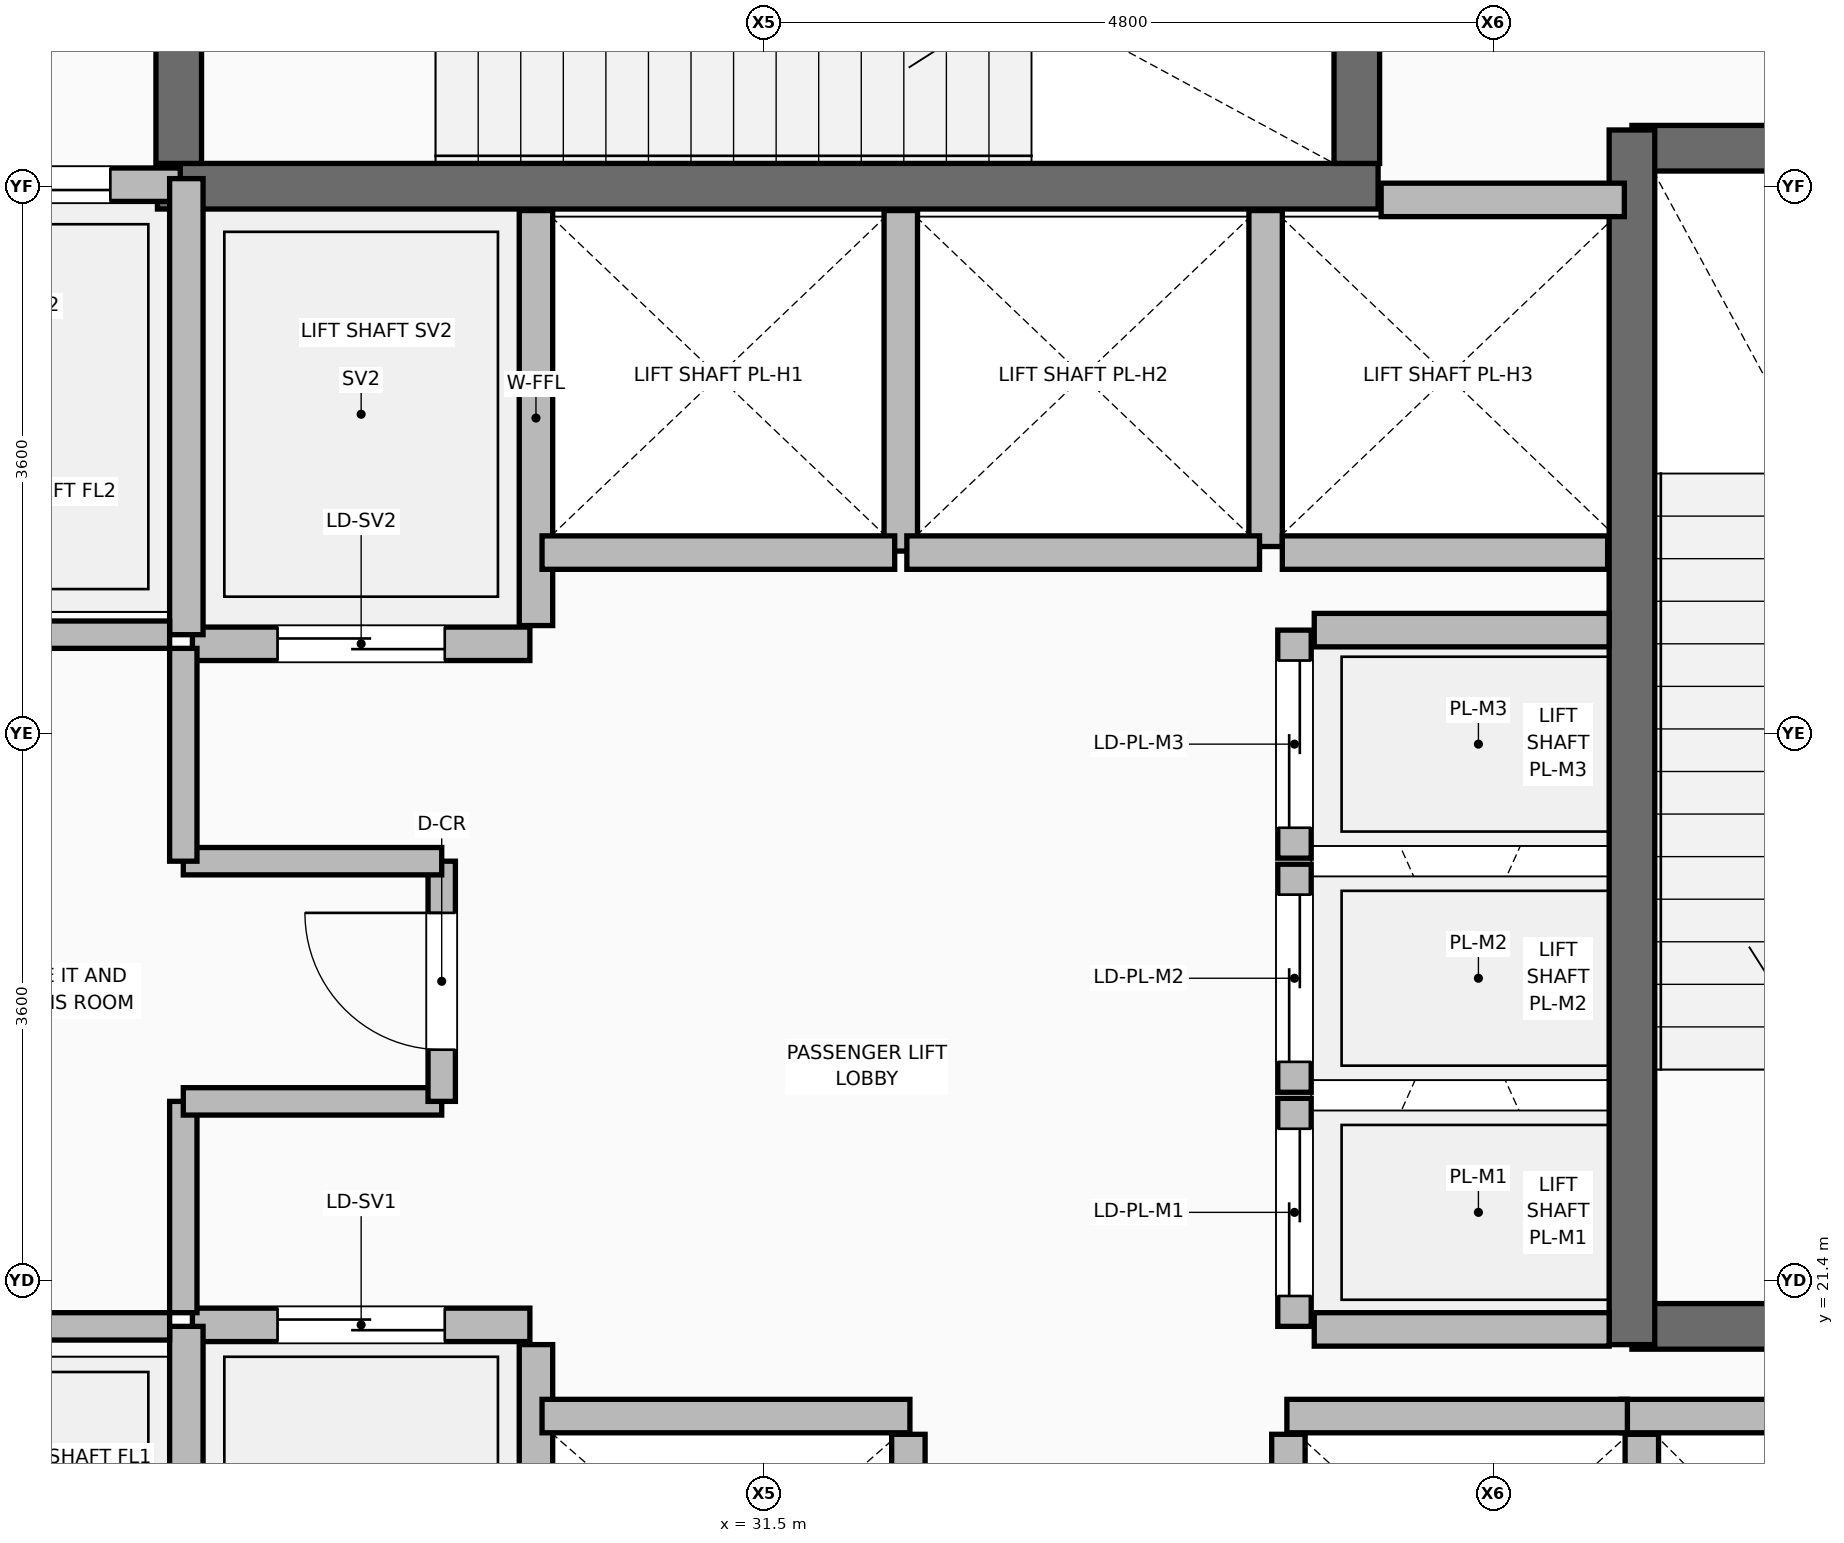
"""IFC4 building model, lengths in metres.
Left out: names, types, materials, properties, quantities, classifications, styles, units other than length and angle.
Written with IfcOpenShell. Run it as: python <this file> out.ifc"""

import sys

from ifc_helpers import new_model, si_unit, direction, frame, frame_2d, origin, place, context, subcontext, project, spatial, rectangle, extrude, element, fill, save


model = new_model("IFC4")
c1 = context("Model", 3, precision=1e-05, world=origin(), true_north=direction((0.0, 1.0)))
c2 = subcontext(c1, "Body", "Model", "MODEL_VIEW")
j1 = project(units=[si_unit("LENGTHUNIT", "METRE"), si_unit("PLANEANGLEUNIT", "RADIAN")], contexts=[c1])
p1 = place(None, origin())
s1 = spatial("IfcSite", under=j1, at=p1, CompositionType="ELEMENT")
p2 = place(p1, origin())
s2 = spatial("IfcBuilding", under=s1, at=p2, CompositionType="ELEMENT")
p3 = place(p2, frame((0.0, 0.0, 175.95)))
s3 = spatial("IfcBuildingStorey", under=s2, at=p3, CompositionType="ELEMENT", Elevation=175.95)
p4 = place(p3, frame((30.0, 18.08, 0.0), z_axis=(0.0, 0.0, 1.0), x_axis=(0.0, 1.0, 0.0)))
e1 = element("IfcWall", 1, at=p4, inside=s3, PredefinedType="PARTITIONING", context=c2, shape_type="SweptSolid", body=[
    extrude(rectangle(XDim=2.9, YDim=0.22, at=frame_2d((1.45, 0.0))), origin(), (0.0, 0.0, 1.0), 5.195),
])
for number, where, z_axis, x_axis in (
    (2, (32.45, 17.92, 0.0), (0.0, 0.0, 1.0), (0.0, 1.0, 0.0)),
    (3, (34.95, 17.92, 0.0), (0.0, 0.0, 1.0), (0.0, 1.0, 0.0)),
):
    element("IfcWall", number, at=place(p3, frame(where, z_axis=z_axis, x_axis=x_axis)), inside=s3, PredefinedType="PARTITIONING", context=c2, shape_type="SweptSolid", body=[
        extrude(rectangle(XDim=2.47, YDim=0.22, at=frame_2d((1.235, 0.0))), origin(), (0.0, 0.0, 1.0), 4.656),
    ])
p5 = place(p3, frame((37.275, 18.08, 0.0), z_axis=(0.0, 0.0, 1.0), x_axis=(0.0, 1.0, 0.0)))
e4 = element("IfcWall", 4, at=p5, inside=s3, PredefinedType="PARTITIONING", context=c2, shape_type="SweptSolid", body=[
    extrude(rectangle(XDim=2.31, YDim=0.22, at=frame_2d((1.155, 0.0))), origin(), (0.0, 0.0, 1.0), 5.195),
])
p6 = place(p3, frame((30.0, 25.71, 0.0), z_axis=(0.0, 0.0, 1.0), x_axis=(0.0, 1.0, 0.0)))
e5 = element("IfcWall", 5, at=p6, inside=s3, PredefinedType="PARTITIONING", context=c2, shape_type="SweptSolid", body=[
    extrude(rectangle(XDim=2.73, YDim=0.22, at=frame_2d((1.365, 0.0))), origin(), (0.0, 0.0, 1.0), 5.195),
])
p7 = place(p3, frame((32.4, 26.2, 0.0), z_axis=(0.0, 0.0, 1.0), x_axis=(0.0, 1.0, 0.0)))
e6 = element("IfcWall", 6, at=p7, inside=s3, PredefinedType="PARTITIONING", context=c2, shape_type="SweptSolid", body=[
    extrude(rectangle(XDim=2.24, YDim=0.22, at=frame_2d((1.12, 0.0))), origin(), (0.0, 0.0, 1.0), 5.195),
])
p8 = place(p3, frame((34.8, 26.23, 0.0), z_axis=(0.0, 0.0, 1.0), x_axis=(0.0, 1.0, 0.0)))
e7 = element("IfcWall", 7, at=p8, inside=s3, PredefinedType="PARTITIONING", context=c2, shape_type="SweptSolid", body=[
    extrude(rectangle(XDim=2.21, YDim=0.22, at=frame_2d((1.105, 0.0))), origin(), (0.0, 0.0, 1.0), 5.195),
])
p9 = place(p3, frame((34.91, 26.19, 0.0), z_axis=(0.0, 0.0, 1.0), x_axis=(1.0, 0.0, 0.0)))
e8 = element("IfcWall", 8, at=p9, inside=s3, PredefinedType="PARTITIONING", context=c2, shape_type="SweptSolid", body=[
    extrude(rectangle(XDim=2.14, YDim=0.22, at=frame_2d((1.07, 0.0))), origin(), (0.0, 0.0, 1.0), 5.195),
])
for number, where, z_axis, x_axis in (
    (9, (37.21, 21.1, 0.0), (0.0, 0.0, 1.0), (1.0, 0.0, 0.0)),
    (10, (37.21, 28.85, 0.0), (0.0, 0.0, 1.0), (1.0, 0.0, 0.0)),
):
    element("IfcWall", number, at=place(p3, frame(where, z_axis=z_axis, x_axis=x_axis)), inside=s3, PredefinedType="SHEAR", context=c2, shape_type="SweptSolid", body=[
        extrude(rectangle(XDim=3.615, YDim=0.3, at=frame_2d((1.808, 0.0))), origin(), (0.0, 0.0, 1.0), 5.22),
    ])
p10 = place(p3, frame((37.21, 20.98, 0.0), z_axis=(0.0, 0.0, 1.0), x_axis=(0.0, 1.0, 0.0)))
e11 = element("IfcWall", 11, at=p10, inside=s3, PredefinedType="SHEAR", context=c2, shape_type="SweptSolid", body=[
    extrude(rectangle(XDim=7.99, YDim=0.3, at=frame_2d((3.995, 0.0))), origin(), (0.0, 0.0, 1.0), 5.22),
])
p11 = place(p3, frame((27.51, 28.6, 0.0), z_axis=(0.0, 0.0, 1.0), x_axis=(1.0, 0.0, 0.0)))
e12 = element("IfcWall", 12, at=p11, inside=s3, PredefinedType="SHEAR", context=c2, shape_type="SweptSolid", body=[
    extrude(rectangle(XDim=8.03, YDim=0.3, at=frame_2d((4.015, 0.0))), origin(), (0.0, 0.0, 1.0), 5.22),
])
p12 = place(p3, frame((27.65, 28.75, 0.0), z_axis=(0.0, 0.0, 1.0), x_axis=(0.0, 1.0, 0.0)))
e13 = element("IfcWall", 13, at=p12, inside=s3, PredefinedType="SHEAR", context=c2, shape_type="SweptSolid", body=[
    extrude(rectangle(XDim=3.425, YDim=0.3, at=frame_2d((1.712, 0.0))), origin(), (0.0, 0.0, 1.0), 5.22),
])
p13 = place(p12, frame((1.0, 0.0, 0.0)))
e14 = element("IfcOpeningElement", 14, at=p13, cuts=e13, PredefinedType="OPENING", context=c2, shape_type="SweptSolid", body=[
    extrude(rectangle(XDim=1.05, YDim=2.1, at=frame_2d((0.525, 1.05))), frame((0.0, 0.16, 0.0), z_axis=(0.0, -1.0, 0.0), x_axis=(1.0, 0.0, 0.0)), (0.0, 0.0, 1.0), 0.32),
])
p14 = place(p3, frame((35.4, 28.75, 0.0), z_axis=(0.0, 0.0, 1.0), x_axis=(0.0, 1.0, 0.0)))
e15 = element("IfcWall", 15, at=p14, inside=s3, PredefinedType="SHEAR", context=c2, shape_type="SweptSolid", body=[
    extrude(rectangle(XDim=3.425, YDim=0.3, at=frame_2d((1.712, 0.0))), origin(), (0.0, 0.0, 1.0), 5.22),
])
p15 = place(p3, frame((25.64, 28.61, 0.0), z_axis=(0.0, 0.0, 1.0), x_axis=(1.0, 0.0, 0.0)))
e16 = element("IfcWall", 16, at=p15, inside=s3, PredefinedType="PARTITIONING", context=c2, shape_type="SweptSolid", body=[
    extrude(rectangle(XDim=2.02, YDim=0.22, at=frame_2d((1.01, 0.0))), origin(), (0.0, 0.0, 1.0), 5.2),
])
p16 = place(p15, frame((0.46, 0.0, 0.0)))
e17 = element("IfcOpeningElement", 17, at=p16, cuts=e16, PredefinedType="OPENING", context=c2, shape_type="SweptSolid", body=[
    extrude(rectangle(XDim=1.1, YDim=2.2, at=frame_2d((0.55, 1.1))), frame((0.0, 0.12, 0.0), z_axis=(0.0, -1.0, 0.0), x_axis=(1.0, 0.0, 0.0)), (0.0, 0.0, 1.0), 0.24),
])
p17 = place(p3, frame((27.74, 21.11, 0.0), z_axis=(0.0, 0.0, 1.0), x_axis=(1.0, 0.0, 0.0)))
e18 = element("IfcWall", 18, at=p17, inside=s3, PredefinedType="PARTITIONING", context=c2, shape_type="SweptSolid", body=[
    extrude(rectangle(XDim=2.22, YDim=0.22, at=frame_2d((1.11, 0.0))), origin(), (0.0, 0.0, 1.0), 5.2),
])
p18 = place(p17, frame((0.56, 0.0, 0.0)))
e19 = element("IfcOpeningElement", 19, at=p18, cuts=e18, PredefinedType="OPENING", context=c2, shape_type="SweptSolid", body=[
    extrude(rectangle(XDim=1.1, YDim=2.2, at=frame_2d((0.55, 1.1))), frame((0.0, 0.12, 0.0), z_axis=(0.0, -1.0, 0.0), x_axis=(1.0, 0.0, 0.0)), (0.0, 0.0, 1.0), 0.24),
])
p19 = place(p3, frame((27.74, 25.59, 0.0), z_axis=(0.0, 0.0, 1.0), x_axis=(1.0, 0.0, 0.0)))
e20 = element("IfcWall", 20, at=p19, inside=s3, PredefinedType="PARTITIONING", context=c2, shape_type="SweptSolid", body=[
    extrude(rectangle(XDim=2.22, YDim=0.22, at=frame_2d((1.11, 0.0))), origin(), (0.0, 0.0, 1.0), 5.2),
])
p20 = place(p19, frame((0.56, 0.0, 0.0)))
e21 = element("IfcOpeningElement", 21, at=p20, cuts=e20, PredefinedType="OPENING", context=c2, shape_type="SweptSolid", body=[
    extrude(rectangle(XDim=1.1, YDim=2.2, at=frame_2d((0.55, 1.1))), frame((0.0, 0.12, 0.0), z_axis=(0.0, -1.0, 0.0), x_axis=(1.0, 0.0, 0.0)), (0.0, 0.0, 1.0), 0.24),
])
p21 = place(p3, frame((30.04, 20.51, 0.0), z_axis=(0.0, 0.0, 1.0), x_axis=(1.0, 0.0, 0.0)))
e22 = element("IfcWall", 22, at=p21, inside=s3, PredefinedType="PARTITIONING", context=c2, shape_type="SweptSolid", body=[
    extrude(rectangle(XDim=2.42, YDim=0.22, at=frame_2d((1.21, 0.0))), origin(), (0.0, 0.0, 1.0), 5.2),
])
for number, where, z_axis, x_axis in (
    (23, (37.14, 20.51, 0.0), (0.0, 0.0, 1.0), (1.0, 0.0, 0.0)),
    (24, (34.94, 20.51, 0.0), (0.0, 0.0, 1.0), (1.0, 0.0, 0.0)),
):
    element("IfcWall", number, at=place(p3, frame(where, z_axis=z_axis, x_axis=x_axis)), inside=s3, PredefinedType="PARTITIONING", context=c2, shape_type="SweptSolid", body=[
        extrude(rectangle(XDim=2.24, YDim=0.22, at=frame_2d((1.12, 0.0))), origin(), (0.0, 0.0, 1.0), 5.2),
    ])
for number, where, z_axis, x_axis in (
    (25, (30.04, 26.19, 0.0), (0.0, 0.0, 1.0), (1.0, 0.0, 0.0)),
    (26, (32.44, 26.19, 0.0), (0.0, 0.0, 1.0), (1.0, 0.0, 0.0)),
):
    element("IfcWall", number, at=place(p3, frame(where, z_axis=z_axis, x_axis=x_axis)), inside=s3, PredefinedType="PARTITIONING", context=c2, shape_type="SweptSolid", body=[
        extrude(rectangle(XDim=2.32, YDim=0.22, at=frame_2d((1.16, 0.0))), origin(), (0.0, 0.0, 1.0), 5.2),
    ])
p22 = place(p3, frame((35.56, 28.51, 0.0), z_axis=(0.0, 0.0, 1.0), x_axis=(1.0, 0.0, 0.0)))
e27 = element("IfcWall", 27, at=p22, inside=s3, PredefinedType="PARTITIONING", context=c2, shape_type="SweptSolid", body=[
    extrude(rectangle(XDim=1.6, YDim=0.22, at=frame_2d((0.8, 0.0))), origin(), (0.0, 0.0, 1.0), 5.2),
])
p23 = place(p3, frame((34.99, 21.1, 0.0), z_axis=(0.0, 0.0, 1.0), x_axis=(0.0, 1.0, 0.0)))
e28 = element("IfcWall", 28, at=p23, inside=s3, PredefinedType="PARTITIONING", context=c2, shape_type="SweptSolid", body=[
    extrude(rectangle(XDim=1.5, YDim=0.22, at=frame_2d((0.75, 0.0))), origin(), (0.0, 0.0, 1.0), 5.2),
])
p24 = place(p23, frame((0.2, 0.0, 0.0)))
e29 = element("IfcOpeningElement", 29, at=p24, cuts=e28, PredefinedType="OPENING", context=c2, shape_type="SweptSolid", body=[
    extrude(rectangle(XDim=1.1, YDim=2.2, at=frame_2d((0.55, 1.1))), frame((0.0, 0.12, 0.0), z_axis=(0.0, -1.0, 0.0), x_axis=(1.0, 0.0, 0.0)), (0.0, 0.0, 1.0), 0.24),
])
p25 = place(p3, frame((34.99, 22.64, 0.0), z_axis=(0.0, 0.0, 1.0), x_axis=(0.0, 1.0, 0.0)))
e30 = element("IfcWall", 30, at=p25, inside=s3, PredefinedType="PARTITIONING", context=c2, shape_type="SweptSolid", body=[
    extrude(rectangle(XDim=1.5, YDim=0.22, at=frame_2d((0.75, 0.0))), origin(), (0.0, 0.0, 1.0), 5.2),
])
p26 = place(p25, frame((0.2, 0.0, 0.0)))
e31 = element("IfcOpeningElement", 31, at=p26, cuts=e30, PredefinedType="OPENING", context=c2, shape_type="SweptSolid", body=[
    extrude(rectangle(XDim=1.1, YDim=2.2, at=frame_2d((0.55, 1.1))), frame((0.0, 0.12, 0.0), z_axis=(0.0, -1.0, 0.0), x_axis=(1.0, 0.0, 0.0)), (0.0, 0.0, 1.0), 0.24),
])
p27 = place(p3, frame((34.99, 24.18, 0.0), z_axis=(0.0, 0.0, 1.0), x_axis=(0.0, 1.0, 0.0)))
e32 = element("IfcWall", 32, at=p27, inside=s3, PredefinedType="PARTITIONING", context=c2, shape_type="SweptSolid", body=[
    extrude(rectangle(XDim=1.5, YDim=0.22, at=frame_2d((0.75, 0.0))), origin(), (0.0, 0.0, 1.0), 5.2),
])
p28 = place(p27, frame((0.2, 0.0, 0.0)))
e33 = element("IfcOpeningElement", 33, at=p28, cuts=e32, PredefinedType="OPENING", context=c2, shape_type="SweptSolid", body=[
    extrude(rectangle(XDim=1.1, YDim=2.2, at=frame_2d((0.55, 1.1))), frame((0.0, 0.12, 0.0), z_axis=(0.0, -1.0, 0.0), x_axis=(1.0, 0.0, 0.0)), (0.0, 0.0, 1.0), 0.24),
])
p29 = place(p3, frame((27.7, 18.15, 0.0), z_axis=(0.0, 0.0, 1.0), x_axis=(0.0, 1.0, 0.0)))
e34 = element("IfcWall", 34, at=p29, inside=s3, PredefinedType="PARTITIONING", context=c2, shape_type="SweptSolid", body=[
    extrude(rectangle(XDim=2.95, YDim=0.22, at=frame_2d((1.475, 0.0))), origin(), (0.0, 0.0, 1.0), 5.2),
])
p30 = place(p3, frame((27.7, 25.65, 0.0), z_axis=(0.0, 0.0, 1.0), x_axis=(0.0, 1.0, 0.0)))
e35 = element("IfcWall", 35, at=p30, inside=s3, PredefinedType="PARTITIONING", context=c2, shape_type="SweptSolid", body=[
    extrude(rectangle(XDim=3.0, YDim=0.22, at=frame_2d((1.5, 0.0))), origin(), (0.0, 0.0, 1.0), 5.2),
])
for number, where, z_axis, x_axis in (
    (36, (35.12, 21.08, 0.0), (0.0, 0.0, 1.0), (1.0, 0.0, 0.0)),
    (37, (35.12, 25.68, 0.0), (0.0, 0.0, 1.0), (1.0, 0.0, 0.0)),
):
    element("IfcWall", number, at=place(p3, frame(where, z_axis=z_axis, x_axis=x_axis)), inside=s3, PredefinedType="PARTITIONING", context=c2, shape_type="SweptSolid", body=[
        extrude(rectangle(XDim=1.94, YDim=0.22, at=frame_2d((0.97, 0.0))), origin(), (0.0, 0.0, 1.0), 5.2),
    ])
for number, where, z_axis, x_axis in (
    (38, (25.89, 21.1, 0.0), (0.0, 0.0, 1.0), (1.0, 0.0, 0.0)),
    (39, (25.89, 25.65, 0.0), (0.0, 0.0, 1.0), (1.0, 0.0, 0.0)),
):
    element("IfcWall", number, at=place(p3, frame(where, z_axis=z_axis, x_axis=x_axis)), inside=s3, PredefinedType="PARTITIONING", context=c2, shape_type="SweptSolid", body=[
        extrude(rectangle(XDim=1.7, YDim=0.18, at=frame_2d((0.85, 0.0))), origin(), (0.0, 0.0, 1.0), 5.2),
    ])
p31 = place(p3, frame((27.68, 21.19, 0.0), z_axis=(0.0, 0.0, 1.0), x_axis=(0.0, 1.0, 0.0)))
e40 = element("IfcWall", 40, at=p31, inside=s3, PredefinedType="PARTITIONING", context=c2, shape_type="SweptSolid", body=[
    extrude(rectangle(XDim=1.39, YDim=0.18, at=frame_2d((0.695, 0.0))), origin(), (0.0, 0.0, 1.0), 5.2),
])
p32 = place(p3, frame((27.68, 22.58, 0.0), z_axis=(0.0, 0.0, 1.0), x_axis=(1.0, 0.0, 0.0)))
e41 = element("IfcWall", 41, at=p32, inside=s3, PredefinedType="PARTITIONING", context=c2, shape_type="SweptSolid", body=[
    extrude(rectangle(XDim=1.7, YDim=0.18, at=frame_2d((0.85, 0.0))), origin(), (0.0, 0.0, 1.0), 5.2),
])
p33 = place(p3, frame((29.38, 22.58, 0.0), z_axis=(0.0, 0.0, 1.0), x_axis=(0.0, 1.0, 0.0)))
e42 = element("IfcWall", 42, at=p33, inside=s3, PredefinedType="PARTITIONING", context=c2, shape_type="SweptSolid", body=[
    extrude(rectangle(XDim=1.58, YDim=0.18, at=frame_2d((0.79, 0.0))), origin(), (0.0, 0.0, 1.0), 5.2),
])
p34 = place(p33, frame((0.34, 0.0, 0.0)))
e43 = element("IfcOpeningElement", 43, at=p34, cuts=e42, PredefinedType="OPENING", context=c2, shape_type="SweptSolid", body=[
    extrude(rectangle(XDim=0.9, YDim=2.1, at=frame_2d((0.45, 1.05))), frame((0.0, 0.1, 0.0), z_axis=(0.0, -1.0, 0.0), x_axis=(1.0, 0.0, 0.0)), (0.0, 0.0, 1.0), 0.2),
])
p35 = place(p3, frame((27.68, 24.16, 0.0), z_axis=(0.0, 0.0, 1.0), x_axis=(1.0, 0.0, 0.0)))
e44 = element("IfcWall", 44, at=p35, inside=s3, PredefinedType="PARTITIONING", context=c2, shape_type="SweptSolid", body=[
    extrude(rectangle(XDim=1.7, YDim=0.18, at=frame_2d((0.85, 0.0))), origin(), (0.0, 0.0, 1.0), 5.2),
])
p36 = place(p3, frame((27.68, 24.16, 0.0), z_axis=(0.0, 0.0, 1.0), x_axis=(0.0, 1.0, 0.0)))
e45 = element("IfcWall", 45, at=p36, inside=s3, PredefinedType="PARTITIONING", context=c2, shape_type="SweptSolid", body=[
    extrude(rectangle(XDim=1.4, YDim=0.18, at=frame_2d((0.7, 0.0))), origin(), (0.0, 0.0, 1.0), 5.2),
])
p37 = place(p16, origin())
e46 = element("IfcDoor", 46, at=p37, inside=s3, OperationType="DOUBLE_DOOR_SLIDING", PredefinedType="DOOR", context=c2, shape_type="SweptSolid", body=[
    extrude(rectangle(XDim=1.1, YDim=2.2, at=frame_2d((0.55, 1.1))), frame((0.0, 0.025, 0.0), z_axis=(0.0, -1.0, 0.0), x_axis=(1.0, 0.0, 0.0)), (0.0, 0.0, 1.0), 0.05),
])
fill(e17, e46)
p38 = place(p18, origin())
e47 = element("IfcDoor", 47, at=p38, inside=s3, OperationType="DOUBLE_DOOR_SLIDING", PredefinedType="DOOR", context=c2, shape_type="SweptSolid", body=[
    extrude(rectangle(XDim=1.1, YDim=2.2, at=frame_2d((0.55, 1.1))), frame((0.0, 0.025, 0.0), z_axis=(0.0, -1.0, 0.0), x_axis=(1.0, 0.0, 0.0)), (0.0, 0.0, 1.0), 0.05),
])
fill(e19, e47)
p39 = place(p20, frame((1.1, 0.0, 0.0), z_axis=(0.0, 0.0, 1.0), x_axis=(-1.0, 0.0, 0.0)))
e48 = element("IfcDoor", 48, at=p39, inside=s3, OperationType="DOUBLE_DOOR_SLIDING", PredefinedType="DOOR", context=c2, shape_type="SweptSolid", body=[
    extrude(rectangle(XDim=1.1, YDim=2.2, at=frame_2d((0.55, 1.1))), frame((0.0, 0.025, 0.0), z_axis=(0.0, -1.0, 0.0), x_axis=(1.0, 0.0, 0.0)), (0.0, 0.0, 1.0), 0.05),
])
fill(e21, e48)
p40 = place(p24, origin())
e49 = element("IfcDoor", 49, at=p40, inside=s3, OperationType="DOUBLE_DOOR_SLIDING", PredefinedType="DOOR", context=c2, shape_type="SweptSolid", body=[
    extrude(rectangle(XDim=1.1, YDim=2.2, at=frame_2d((0.55, 1.1))), frame((0.0, 0.025, 0.0), z_axis=(0.0, -1.0, 0.0), x_axis=(1.0, 0.0, 0.0)), (0.0, 0.0, 1.0), 0.05),
])
fill(e29, e49)
p41 = place(p26, origin())
e50 = element("IfcDoor", 50, at=p41, inside=s3, OperationType="DOUBLE_DOOR_SLIDING", PredefinedType="DOOR", context=c2, shape_type="SweptSolid", body=[
    extrude(rectangle(XDim=1.1, YDim=2.2, at=frame_2d((0.55, 1.1))), frame((0.0, 0.025, 0.0), z_axis=(0.0, -1.0, 0.0), x_axis=(1.0, 0.0, 0.0)), (0.0, 0.0, 1.0), 0.05),
])
fill(e31, e50)
p42 = place(p28, origin())
e51 = element("IfcDoor", 51, at=p42, inside=s3, OperationType="DOUBLE_DOOR_SLIDING", PredefinedType="DOOR", context=c2, shape_type="SweptSolid", body=[
    extrude(rectangle(XDim=1.1, YDim=2.2, at=frame_2d((0.55, 1.1))), frame((0.0, 0.025, 0.0), z_axis=(0.0, -1.0, 0.0), x_axis=(1.0, 0.0, 0.0)), (0.0, 0.0, 1.0), 0.05),
])
fill(e33, e51)
p43 = place(p34, origin())
e52 = element("IfcDoor", 52, at=p43, inside=s3, OperationType="SINGLE_SWING_RIGHT", PredefinedType="DOOR", context=c2, shape_type="SweptSolid", body=[
    extrude(rectangle(XDim=0.9, YDim=2.1, at=frame_2d((0.45, 1.05))), frame((0.0, 0.025, 0.0), z_axis=(0.0, -1.0, 0.0), x_axis=(1.0, 0.0, 0.0)), (0.0, 0.0, 1.0), 0.05),
])
fill(e43, e52)
save(model, sys.argv[1])
